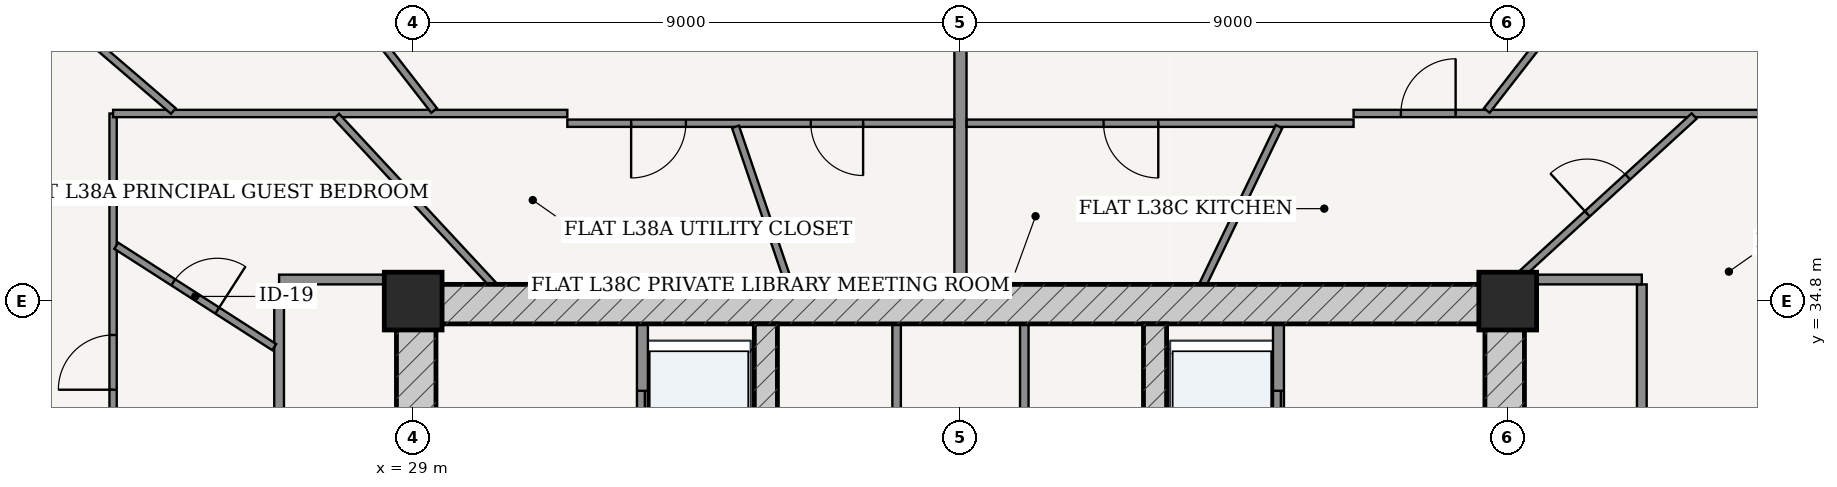
"""IFC4 building model, lengths in metres.
Left out: names, types, materials, properties, quantities, classifications, styles, units other than length and angle.
Written with IfcOpenShell. Run it as: python <this file> out.ifc"""

import sys

from ifc_helpers import new_model, si_unit, direction, frame, frame_2d, origin, origin_2d, place, context, subcontext, project, spatial, rectangle, extrude, source, transform, mapped, element, fill, save


model = new_model("IFC4")
c1 = context("Model", 3, precision=1e-05, world=origin(), true_north=direction((-0.2419218956, 0.970295726276)))
c2 = subcontext(c1, "Body", "Model", "MODEL_VIEW")
j1 = project(units=[si_unit("LENGTHUNIT", "METRE"), si_unit("PLANEANGLEUNIT", "RADIAN")], contexts=[c1])
p1 = place(None, origin())
s1 = spatial("IfcSite", under=j1, at=p1, CompositionType="ELEMENT")
p2 = place(p1, origin())
s2 = spatial("IfcBuilding", under=s1, at=p2, CompositionType="ELEMENT")
p3 = place(p2, frame((0.0, 0.0, 146.2)))
s3 = spatial("IfcBuildingStorey", under=s2, at=p3, CompositionType="ELEMENT", Elevation=146.2)
for number, where, z_axis, x_axis in (
    (1, (47.0, 34.8, 0.0), (0.0, 0.0, 1.0), (1.0, 0.0, 0.0)),
    (2, (29.0, 34.8, 0.0), (0.0, 0.0, 1.0), (1.0, 0.0, 0.0)),
):
    element("IfcColumn", number, at=place(p3, frame(where, z_axis=z_axis, x_axis=x_axis)), inside=s3, PredefinedType="COLUMN", context=c2, shape_type="SweptSolid", body=[
        extrude(rectangle(XDim=0.95, YDim=0.95, at=origin_2d()), origin(), (0.0, 0.0, 1.0), 3.6),
    ])
p4 = place(p3, frame((28.725, 34.75, 0.0), z_axis=(0.0, 0.0, 1.0), x_axis=(1.0, 0.0, 0.0)))
e3 = element("IfcWall", 3, at=p4, inside=s3, PredefinedType="SHEAR", context=c2, shape_type="SweptSolid", body=[
    extrude(rectangle(XDim=18.55, YDim=0.65, at=frame_2d((9.275, 0.0))), origin(), (0.0, 0.0, 1.0), 3.33),
])
p5 = place(p3, frame((29.05, 19.175, 0.0), z_axis=(0.0, 0.0, 1.0), x_axis=(0.0, 1.0, 0.0)))
e4 = element("IfcWall", 4, at=p5, inside=s3, PredefinedType="SHEAR", context=c2, shape_type="SweptSolid", body=[
    extrude(rectangle(XDim=15.25, YDim=0.65, at=frame_2d((7.625, 0.0))), origin(), (0.0, 0.0, 1.0), 3.33),
])
p6 = place(p5, frame((9.875, 0.0, 0.0)))
e5 = element("IfcOpeningElement", 5, at=p6, cuts=e4, PredefinedType="OPENING", context=c2, shape_type="SweptSolid", body=[
    extrude(rectangle(XDim=1.5, YDim=2.2, at=frame_2d((0.75, 1.1))), frame((0.0, 0.335, 0.0), z_axis=(0.0, -1.0, 0.0), x_axis=(1.0, 0.0, 0.0)), (0.0, 0.0, 1.0), 0.67),
])
p7 = place(p3, frame((46.95, 19.175, 0.0), z_axis=(0.0, 0.0, 1.0), x_axis=(0.0, 1.0, 0.0)))
e6 = element("IfcWall", 6, at=p7, inside=s3, PredefinedType="SHEAR", context=c2, shape_type="SweptSolid", body=[
    extrude(rectangle(XDim=15.25, YDim=0.65, at=frame_2d((7.625, 0.0))), origin(), (0.0, 0.0, 1.0), 3.33),
])
p8 = place(p7, frame((9.875, 0.0, 0.0)))
e7 = element("IfcOpeningElement", 7, at=p8, cuts=e6, PredefinedType="OPENING", context=c2, shape_type="SweptSolid", body=[
    extrude(rectangle(XDim=1.5, YDim=2.2, at=frame_2d((0.75, 1.1))), frame((0.0, 0.335, 0.0), z_axis=(0.0, -1.0, 0.0), x_axis=(1.0, 0.0, 0.0)), (0.0, 0.0, 1.0), 0.67),
])
p9 = place(p3, frame((34.8, 19.175, 0.0), z_axis=(0.0, 0.0, 1.0), x_axis=(0.0, 1.0, 0.0)))
e8 = element("IfcWall", 8, at=p9, inside=s3, PredefinedType="SHEAR", context=c2, shape_type="SweptSolid", body=[
    extrude(rectangle(XDim=15.25, YDim=0.38, at=frame_2d((7.625, 0.0))), origin(), (0.0, 0.0, 1.0), 3.33),
])
p10 = place(p9, frame((7.8, 0.0, 0.0)))
e9 = element("IfcOpeningElement", 9, at=p10, cuts=e8, PredefinedType="OPENING", context=c2, shape_type="SweptSolid", body=[
    extrude(rectangle(XDim=1.05, YDim=2.15, at=frame_2d((0.525, 1.075))), frame((0.0, 0.2, 0.0), z_axis=(0.0, -1.0, 0.0), x_axis=(1.0, 0.0, 0.0)), (0.0, 0.0, 1.0), 0.4),
])
p11 = place(p3, frame((41.2, 19.175, 0.0), z_axis=(0.0, 0.0, 1.0), x_axis=(0.0, 1.0, 0.0)))
e10 = element("IfcWall", 10, at=p11, inside=s3, PredefinedType="SHEAR", context=c2, shape_type="SweptSolid", body=[
    extrude(rectangle(XDim=15.25, YDim=0.38, at=frame_2d((7.625, 0.0))), origin(), (0.0, 0.0, 1.0), 3.33),
])
p12 = place(p11, frame((7.8, 0.0, 0.0)))
e11 = element("IfcOpeningElement", 11, at=p12, cuts=e10, PredefinedType="OPENING", context=c2, shape_type="SweptSolid", body=[
    extrude(rectangle(XDim=1.05, YDim=2.15, at=frame_2d((0.525, 1.075))), frame((0.0, 0.2, 0.0), z_axis=(0.0, -1.0, 0.0), x_axis=(1.0, 0.0, 0.0)), (0.0, 0.0, 1.0), 0.4),
])
p13 = place(p3, frame((32.77, 28.52, 0.0), z_axis=(0.0, 0.0, 1.0), x_axis=(0.0, 1.0, 0.0)))
e12 = element("IfcWall", 12, at=p13, inside=s3, PredefinedType="PARTITIONING", context=c2, shape_type="SweptSolid", body=[
    extrude(rectangle(XDim=5.905, YDim=0.18, at=frame_2d((2.953, 0.0))), origin(), (0.0, 0.0, 1.0), 3.33),
])
p14 = place(p13, frame((3.655, 0.0, 0.0)))
e13 = element("IfcOpeningElement", 13, at=p14, cuts=e12, PredefinedType="OPENING", context=c2, shape_type="SweptSolid", body=[
    extrude(rectangle(XDim=1.15, YDim=2.2, at=frame_2d((0.575, 1.1))), frame((0.0, 0.1, 0.0), z_axis=(0.0, -1.0, 0.0), x_axis=(1.0, 0.0, 0.0)), (0.0, 0.0, 1.0), 0.2),
])
p15 = place(p13, frame((0.73, 0.0, 0.0)))
e14 = element("IfcOpeningElement", 14, at=p15, cuts=e12, PredefinedType="OPENING", context=c2, shape_type="SweptSolid", body=[
    extrude(rectangle(XDim=1.2, YDim=2.25, at=frame_2d((0.6, 1.125))), frame((0.0, 0.1, 0.0), z_axis=(0.0, -1.0, 0.0), x_axis=(1.0, 0.0, 0.0)), (0.0, 0.0, 1.0), 0.2),
])
p16 = place(p3, frame((43.23, 28.52, 0.0), z_axis=(0.0, 0.0, 1.0), x_axis=(0.0, 1.0, 0.0)))
e15 = element("IfcWall", 15, at=p16, inside=s3, PredefinedType="PARTITIONING", context=c2, shape_type="SweptSolid", body=[
    extrude(rectangle(XDim=5.905, YDim=0.18, at=frame_2d((2.953, 0.0))), origin(), (0.0, 0.0, 1.0), 3.33),
])
p17 = place(p16, frame((0.905, 0.0, 0.0)))
e16 = element("IfcOpeningElement", 16, at=p17, cuts=e15, PredefinedType="OPENING", context=c2, shape_type="SweptSolid", body=[
    extrude(rectangle(XDim=0.85, YDim=2.1, at=frame_2d((0.425, 1.05))), frame((0.0, 0.1, 0.0), z_axis=(0.0, -1.0, 0.0), x_axis=(1.0, 0.0, 0.0)), (0.0, 0.0, 1.0), 0.2),
])
p18 = place(p16, frame((3.655, 0.0, 0.0)))
e17 = element("IfcOpeningElement", 17, at=p18, cuts=e15, PredefinedType="OPENING", context=c2, shape_type="SweptSolid", body=[
    extrude(rectangle(XDim=1.15, YDim=2.2, at=frame_2d((0.575, 1.1))), frame((0.0, 0.1, 0.0), z_axis=(0.0, -1.0, 0.0), x_axis=(1.0, 0.0, 0.0)), (0.0, 0.0, 1.0), 0.2),
])
for number, where, z_axis, x_axis in (
    (18, (36.95, 28.56, 0.0), (0.0, 0.0, 1.0), (0.0, 1.0, 0.0)),
    (19, (39.05, 28.56, 0.0), (0.0, 0.0, 1.0), (0.0, 1.0, 0.0)),
):
    element("IfcWall", number, at=place(p3, frame(where, z_axis=z_axis, x_axis=x_axis)), inside=s3, PredefinedType="PARTITIONING", context=c2, shape_type="SweptSolid", body=[
        extrude(rectangle(XDim=5.865, YDim=0.14, at=frame_2d((2.933, 0.0))), origin(), (0.0, 0.0, 1.0), 3.33),
    ])
p19 = place(p3, frame((26.795, 24.4, 0.0), z_axis=(0.0, 0.0, 1.0), x_axis=(0.0, 1.0, 0.0)))
e20 = element("IfcWall", 20, at=p19, inside=s3, PredefinedType="PARTITIONING", context=c2, shape_type="SweptSolid", body=[
    extrude(rectangle(XDim=10.675, YDim=0.16, at=frame_2d((5.337, 0.0))), origin(), (0.0, 0.0, 1.0), 2.776),
])
p20 = place(p19, frame((6.702, 0.0, 0.0)))
e21 = element("IfcOpeningElement", 21, at=p20, cuts=e20, PredefinedType="OPENING", context=c2, shape_type="SweptSolid", body=[
    extrude(rectangle(XDim=0.98, YDim=2.2, at=frame_2d((0.49, 1.1))), frame((0.0, 0.09, 0.0), z_axis=(0.0, -1.0, 0.0), x_axis=(1.0, 0.0, 0.0)), (0.0, 0.0, 1.0), 0.18),
])
p21 = place(p3, frame((26.795, 35.155, 0.0), z_axis=(0.0, 0.0, 1.0), x_axis=(1.0, 0.0, 0.0)))
e22 = element("IfcWall", 22, at=p21, inside=s3, PredefinedType="PARTITIONING", context=c2, shape_type="SweptSolid", body=[
    extrude(rectangle(XDim=1.93, YDim=0.16, at=frame_2d((0.965, 0.0))), origin(), (0.0, 0.0, 1.0), 2.776),
])
p22 = place(p3, frame((49.205, 16.675, 0.0), z_axis=(0.0, 0.0, 1.0), x_axis=(0.0, 1.0, 0.0)))
e23 = element("IfcWall", 23, at=p22, inside=s3, PredefinedType="PARTITIONING", context=c2, shape_type="SweptSolid", body=[
    extrude(rectangle(XDim=18.4, YDim=0.16, at=frame_2d((9.2, 0.0))), origin(), (0.0, 0.0, 1.0), 2.776),
])
p23 = place(p22, frame((15.299, 0.0, 0.0)))
e24 = element("IfcOpeningElement", 24, at=p23, cuts=e23, PredefinedType="OPENING", context=c2, shape_type="SweptSolid", body=[
    extrude(rectangle(XDim=0.98, YDim=2.2, at=frame_2d((0.49, 1.1))), frame((0.0, 0.09, 0.0), z_axis=(0.0, -1.0, 0.0), x_axis=(1.0, 0.0, 0.0)), (0.0, 0.0, 1.0), 0.18),
])
p24 = place(p3, frame((47.275, 35.155, 0.0), z_axis=(0.0, 0.0, 1.0), x_axis=(1.0, 0.0, 0.0)))
e25 = element("IfcWall", 25, at=p24, inside=s3, PredefinedType="PARTITIONING", context=c2, shape_type="SweptSolid", body=[
    extrude(rectangle(XDim=1.93, YDim=0.16, at=frame_2d((0.965, 0.0))), origin(), (0.0, 0.0, 1.0), 2.776),
])
p25 = place(p3, frame((38.0, 35.075, 0.0), z_axis=(0.0, 0.0, 1.0), x_axis=(0.0, 1.0, 0.0)))
e26 = element("IfcWall", 26, at=p25, inside=s3, PredefinedType="PARTITIONING", context=c2, shape_type="SweptSolid", body=[
    extrude(rectangle(XDim=12.465, YDim=0.2, at=frame_2d((6.232, 0.0))), origin(), (0.0, 0.0, 1.0), 2.415),
])
p26 = place(p3, frame((24.065, 21.941, 0.0), z_axis=(0.0, 0.0, 1.0), x_axis=(0.0, 1.0, 0.0)))
e27 = element("IfcWall", 27, at=p26, inside=s3, PredefinedType="PARTITIONING", context=c2, shape_type="SweptSolid", body=[
    extrude(rectangle(XDim=15.944, YDim=0.12, at=frame_2d((7.972, 0.0))), origin(), (0.0, 0.0, 1.0), 2.776),
])
p27 = place(p26, frame((5.602, 0.0, 0.0)))
e28 = element("IfcOpeningElement", 28, at=p27, cuts=e27, PredefinedType="OPENING", context=c2, shape_type="SweptSolid", body=[
    extrude(rectangle(XDim=0.9, YDim=2.15, at=frame_2d((0.45, 1.075))), frame((0.0, 0.07, 0.0), z_axis=(0.0, -1.0, 0.0), x_axis=(1.0, 0.0, 0.0)), (0.0, 0.0, 1.0), 0.14),
])
p28 = place(p26, frame((1.707, 0.0, 0.0)))
e29 = element("IfcOpeningElement", 29, at=p28, cuts=e27, PredefinedType="OPENING", context=c2, shape_type="SweptSolid", body=[
    extrude(rectangle(XDim=0.9, YDim=2.15, at=frame_2d((0.45, 1.075))), frame((0.0, 0.07, 0.0), z_axis=(0.0, -1.0, 0.0), x_axis=(1.0, 0.0, 0.0)), (0.0, 0.0, 1.0), 0.14),
])
p29 = place(p26, frame((11.402, 0.0, 0.0)))
e30 = element("IfcOpeningElement", 30, at=p29, cuts=e27, PredefinedType="OPENING", context=c2, shape_type="SweptSolid", body=[
    extrude(rectangle(XDim=0.9, YDim=2.15, at=frame_2d((0.45, 1.075))), frame((0.0, 0.07, 0.0), z_axis=(0.0, -1.0, 0.0), x_axis=(1.0, 0.0, 0.0)), (0.0, 0.0, 1.0), 0.14),
])
p30 = place(p3, frame((24.065, 37.885, 0.0), z_axis=(0.0, 0.0, 1.0), x_axis=(1.0, 0.0, 0.0)))
e31 = element("IfcWall", 31, at=p30, inside=s3, PredefinedType="PARTITIONING", context=c2, shape_type="SweptSolid", body=[
    extrude(rectangle(XDim=7.47, YDim=0.12, at=frame_2d((3.735, 0.0))), origin(), (0.0, 0.0, 1.0), 2.776),
])
p31 = place(p3, frame((31.535, 37.725, 0.0), z_axis=(0.0, 0.0, 1.0), x_axis=(1.0, 0.0, 0.0)))
e32 = element("IfcWall", 32, at=p31, inside=s3, PredefinedType="PARTITIONING", context=c2, shape_type="SweptSolid", body=[
    extrude(rectangle(XDim=6.363, YDim=0.12, at=frame_2d((3.182, 0.0))), origin(), (0.0, 0.0, 1.0), 2.776),
])
p32 = place(p31, frame((4.004, 0.0, 0.0)))
e33 = element("IfcOpeningElement", 33, at=p32, cuts=e32, PredefinedType="OPENING", context=c2, shape_type="SweptSolid", body=[
    extrude(rectangle(XDim=0.86, YDim=2.15, at=frame_2d((0.43, 1.075))), frame((0.0, 0.07, 0.0), z_axis=(0.0, -1.0, 0.0), x_axis=(1.0, 0.0, 0.0)), (0.0, 0.0, 1.0), 0.14),
])
p33 = place(p31, frame((1.049, 0.0, 0.0)))
e34 = element("IfcOpeningElement", 34, at=p33, cuts=e32, PredefinedType="OPENING", context=c2, shape_type="SweptSolid", body=[
    extrude(rectangle(XDim=0.9, YDim=2.15, at=frame_2d((0.45, 1.075))), frame((0.0, 0.07, 0.0), z_axis=(0.0, -1.0, 0.0), x_axis=(1.0, 0.0, 0.0)), (0.0, 0.0, 1.0), 0.14),
])
p34 = place(p3, frame((29.344, 37.934, 0.0), z_axis=(0.0, 0.0, 1.0), x_axis=(-0.613758289074, 0.789493991487, 0.0)))
e35 = element("IfcWall", 35, at=p34, inside=s3, PredefinedType="PARTITIONING", context=c2, shape_type="SweptSolid", body=[
    extrude(rectangle(XDim=7.695, YDim=0.12, at=frame_2d((3.848, 0.0))), origin(), (0.0, 0.0, 1.0), 2.776),
])
p35 = place(p34, frame((2.399, 0.0, 0.0)))
e36 = element("IfcOpeningElement", 36, at=p35, cuts=e35, PredefinedType="OPENING", context=c2, shape_type="SweptSolid", body=[
    extrude(rectangle(XDim=0.9, YDim=2.15, at=frame_2d((0.45, 1.075))), frame((0.0, 0.07, 0.0), z_axis=(0.0, -1.0, 0.0), x_axis=(1.0, 0.0, 0.0)), (0.0, 0.0, 1.0), 0.14),
])
p36 = place(p3, frame((25.056, 37.925, 0.0), z_axis=(0.0, 0.0, 1.0), x_axis=(-0.758354915574, 0.65184186888, 0.0)))
e37 = element("IfcWall", 37, at=p36, inside=s3, PredefinedType="PARTITIONING", context=c2, shape_type="SweptSolid", body=[
    extrude(rectangle(XDim=5.432, YDim=0.12, at=frame_2d((2.716, 0.0))), origin(), (0.0, 0.0, 1.0), 2.846),
])
p37 = place(p36, frame((2.266, 0.0, 0.0)))
e38 = element("IfcOpeningElement", 38, at=p37, cuts=e37, PredefinedType="OPENING", context=c2, shape_type="SweptSolid", body=[
    extrude(rectangle(XDim=0.9, YDim=2.15, at=frame_2d((0.45, 1.075))), frame((0.0, 0.07, 0.0), z_axis=(0.0, -1.0, 0.0), x_axis=(1.0, 0.0, 0.0)), (0.0, 0.0, 1.0), 0.14),
])
p38 = place(p3, frame((24.007, 31.782, 0.0), z_axis=(0.0, 0.0, 1.0), x_axis=(-0.942077868165, 0.335394231187, 0.0)))
e39 = element("IfcWall", 39, at=p38, inside=s3, PredefinedType="PARTITIONING", context=c2, shape_type="SweptSolid", body=[
    extrude(rectangle(XDim=8.817, YDim=0.12, at=frame_2d((4.408, 0.0))), origin(), (0.0, 0.0, 1.0), 2.846),
])
p39 = place(p38, frame((3.958, 0.0, 0.0)))
e40 = element("IfcOpeningElement", 40, at=p39, cuts=e39, PredefinedType="OPENING", context=c2, shape_type="SweptSolid", body=[
    extrude(rectangle(XDim=0.9, YDim=2.15, at=frame_2d((0.45, 1.075))), frame((0.0, 0.07, 0.0), z_axis=(0.0, -1.0, 0.0), x_axis=(1.0, 0.0, 0.0)), (0.0, 0.0, 1.0), 0.14),
])
p40 = place(p3, frame((35.182, 35.075, 0.0), z_axis=(0.0, 0.0, 1.0), x_axis=(-0.322321614946, 0.946630221649, 0.0)))
e41 = element("IfcWall", 41, at=p40, inside=s3, PredefinedType="PARTITIONING", context=c2, shape_type="SweptSolid", body=[
    extrude(rectangle(XDim=2.737, YDim=0.12, at=frame_2d((1.369, 0.0))), origin(), (0.0, 0.0, 1.0), 2.415),
])
p41 = place(p3, frame((30.307, 35.075, 0.0), z_axis=(0.0, 0.0, 1.0), x_axis=(-0.68082810609, 0.732443233267, 0.0)))
e42 = element("IfcWall", 42, at=p41, inside=s3, PredefinedType="PARTITIONING", context=c2, shape_type="SweptSolid", body=[
    extrude(rectangle(XDim=3.775, YDim=0.12, at=frame_2d((1.887, 0.0))), origin(), (0.0, 0.0, 1.0), 2.776),
])
p42 = place(p3, frame((26.715, 34.043, 0.0), z_axis=(0.0, 0.0, 1.0), x_axis=(-0.841597086151, 0.540105864235, 0.0)))
e43 = element("IfcWall", 43, at=p42, inside=s3, PredefinedType="PARTITIONING", context=c2, shape_type="SweptSolid", body=[
    extrude(rectangle(XDim=3.087, YDim=0.12, at=frame_2d((1.543, 0.0))), origin(), (0.0, 0.0, 1.0), 3.005),
])
p43 = place(p42, frame((1.113, 0.0, 0.0)))
e44 = element("IfcOpeningElement", 44, at=p43, cuts=e43, PredefinedType="OPENING", context=c2, shape_type="SweptSolid", body=[
    extrude(rectangle(XDim=0.86, YDim=2.15, at=frame_2d((0.43, 1.075))), frame((0.0, 0.07, 0.0), z_axis=(0.0, -1.0, 0.0), x_axis=(1.0, 0.0, 0.0)), (0.0, 0.0, 1.0), 0.14),
])
p44 = place(p3, frame((38.102, 37.725, 0.0), z_axis=(0.0, 0.0, 1.0), x_axis=(1.0, 0.0, 0.0)))
e45 = element("IfcWall", 45, at=p44, inside=s3, PredefinedType="PARTITIONING", context=c2, shape_type="SweptSolid", body=[
    extrude(rectangle(XDim=6.363, YDim=0.12, at=frame_2d((3.182, 0.0))), origin(), (0.0, 0.0, 1.0), 2.776),
])
p45 = place(p44, frame((2.251, 0.0, 0.0)))
e46 = element("IfcOpeningElement", 46, at=p45, cuts=e45, PredefinedType="OPENING", context=c2, shape_type="SweptSolid", body=[
    extrude(rectangle(XDim=0.9, YDim=2.15, at=frame_2d((0.45, 1.075))), frame((0.0, 0.07, 0.0), z_axis=(0.0, -1.0, 0.0), x_axis=(1.0, 0.0, 0.0)), (0.0, 0.0, 1.0), 0.14),
])
p46 = place(p3, frame((44.465, 37.885, 0.0), z_axis=(0.0, 0.0, 1.0), x_axis=(1.0, 0.0, 0.0)))
e47 = element("IfcWall", 47, at=p46, inside=s3, PredefinedType="PARTITIONING", context=c2, shape_type="SweptSolid", body=[
    extrude(rectangle(XDim=7.47, YDim=0.12, at=frame_2d((3.735, 0.0))), origin(), (0.0, 0.0, 1.0), 2.776),
])
p47 = place(p46, frame((0.778, 0.0, 0.0)))
e48 = element("IfcOpeningElement", 48, at=p47, cuts=e47, PredefinedType="OPENING", context=c2, shape_type="SweptSolid", body=[
    extrude(rectangle(XDim=0.9, YDim=2.15, at=frame_2d((0.45, 1.075))), frame((0.0, 0.07, 0.0), z_axis=(0.0, -1.0, 0.0), x_axis=(1.0, 0.0, 0.0)), (0.0, 0.0, 1.0), 0.14),
])
p48 = place(p3, frame((46.656, 37.934, 0.0), z_axis=(0.0, 0.0, 1.0), x_axis=(0.613758289074, 0.789493991487, 0.0)))
e49 = element("IfcWall", 49, at=p48, inside=s3, PredefinedType="PARTITIONING", context=c2, shape_type="SweptSolid", body=[
    extrude(rectangle(XDim=7.695, YDim=0.12, at=frame_2d((3.848, 0.0))), origin(), (0.0, 0.0, 1.0), 2.776),
])
p49 = place(p48, frame((2.395, 0.0, 0.0)))
e50 = element("IfcOpeningElement", 50, at=p49, cuts=e49, PredefinedType="OPENING", context=c2, shape_type="SweptSolid", body=[
    extrude(rectangle(XDim=0.9, YDim=2.15, at=frame_2d((0.45, 1.075))), frame((0.0, 0.07, 0.0), z_axis=(0.0, -1.0, 0.0), x_axis=(1.0, 0.0, 0.0)), (0.0, 0.0, 1.0), 0.14),
])
p50 = place(p3, frame((47.216, 35.235, 0.0), z_axis=(0.0, 0.0, 1.0), x_axis=(0.73766811085, 0.675163504816, 0.0)))
e51 = element("IfcWall", 51, at=p50, inside=s3, PredefinedType="PARTITIONING", context=c2, shape_type="SweptSolid", body=[
    extrude(rectangle(XDim=3.863, YDim=0.12, at=frame_2d((1.932, 0.0))), origin(), (0.0, 0.0, 1.0), 2.776),
])
p51 = place(p50, frame((1.481, 0.0, 0.0)))
e52 = element("IfcOpeningElement", 52, at=p51, cuts=e51, PredefinedType="OPENING", context=c2, shape_type="SweptSolid", body=[
    extrude(rectangle(XDim=0.9, YDim=2.15, at=frame_2d((0.45, 1.075))), frame((0.0, 0.07, 0.0), z_axis=(0.0, -1.0, 0.0), x_axis=(1.0, 0.0, 0.0)), (0.0, 0.0, 1.0), 0.14),
])
p52 = place(p3, frame((41.988, 35.075, 0.0), z_axis=(0.0, 0.0, 1.0), x_axis=(0.434144408634, 0.900843289619, 0.0)))
e53 = element("IfcWall", 53, at=p52, inside=s3, PredefinedType="PARTITIONING", context=c2, shape_type="SweptSolid", body=[
    extrude(rectangle(XDim=2.88, YDim=0.12, at=frame_2d((1.44, 0.0))), origin(), (0.0, 0.0, 1.0), 3.33),
])
m1 = source(origin(), c2, "Body", "SweptSolid", [
    extrude(rectangle(XDim=1.15, YDim=2.2, at=frame_2d((0.575, 1.1))), frame((0.0, 0.025, 0.0), z_axis=(0.0, -1.0, 0.0), x_axis=(1.0, 0.0, 0.0)), (0.0, 0.0, 1.0), 0.05),
])
p53 = place(p14, origin())
e54 = element("IfcDoor", 54, at=p53, inside=s3, OperationType="DOUBLE_DOOR_SLIDING", PredefinedType="DOOR", context=c2, shape_type="MappedRepresentation", body=[
    mapped(m1, transform((0.0, 0.0, 0.0), scale=1.0)),
])
fill(e13, e54)
p54 = place(p18, origin())
e55 = element("IfcDoor", 55, at=p54, inside=s3, OperationType="DOUBLE_DOOR_SLIDING", PredefinedType="DOOR", context=c2, shape_type="MappedRepresentation", body=[
    mapped(m1, transform((0.0, 0.0, 0.0), scale=1.0)),
])
fill(e17, e55)
m2 = source(origin(), c2, "Body", "SweptSolid", [
    extrude(rectangle(XDim=0.86, YDim=2.15, at=frame_2d((0.43, 1.075))), frame((0.0, 0.025, 0.0), z_axis=(0.0, -1.0, 0.0), x_axis=(1.0, 0.0, 0.0)), (0.0, 0.0, 1.0), 0.05),
])
p55 = place(p43, frame((0.86, 0.0, 0.0), z_axis=(0.0, 0.0, 1.0), x_axis=(-1.0, 0.0, 0.0)))
e56 = element("IfcDoor", 56, at=p55, inside=s3, OperationType="SINGLE_SWING_RIGHT", PredefinedType="DOOR", context=c2, shape_type="MappedRepresentation", body=[
    mapped(m2, transform((0.0, 0.0, 0.0), scale=1.0)),
])
fill(e44, e56)
m3 = source(origin(), c2, "Body", "SweptSolid", [
    extrude(rectangle(XDim=0.9, YDim=2.15, at=frame_2d((0.45, 1.075))), frame((0.0, 0.025, 0.0), z_axis=(0.0, -1.0, 0.0), x_axis=(1.0, 0.0, 0.0)), (0.0, 0.0, 1.0), 0.05),
])
p56 = place(p29, origin())
e57 = element("IfcDoor", 57, at=p56, inside=s3, OperationType="SINGLE_SWING_LEFT", PredefinedType="DOOR", context=c2, shape_type="MappedRepresentation", body=[
    mapped(m3, transform((0.0, 0.0, 0.0), scale=1.0)),
])
fill(e30, e57)
p57 = place(p32, frame((0.86, 0.0, 0.0), z_axis=(0.0, 0.0, 1.0), x_axis=(-1.0, 0.0, 0.0)))
e58 = element("IfcDoor", 58, at=p57, inside=s3, OperationType="SINGLE_SWING_LEFT", PredefinedType="DOOR", context=c2, shape_type="MappedRepresentation", body=[
    mapped(m2, transform((0.0, 0.0, 0.0), scale=1.0)),
])
fill(e33, e58)
p58 = place(p33, frame((0.9, 0.0, 0.0), z_axis=(0.0, 0.0, 1.0), x_axis=(-1.0, 0.0, 0.0)))
e59 = element("IfcDoor", 59, at=p58, inside=s3, OperationType="SINGLE_SWING_RIGHT", PredefinedType="DOOR", context=c2, shape_type="MappedRepresentation", body=[
    mapped(m3, transform((0.0, 0.0, 0.0), scale=1.0)),
])
fill(e34, e59)
p59 = place(p51, origin())
e60 = element("IfcDoor", 60, at=p59, inside=s3, OperationType="SINGLE_SWING_LEFT", PredefinedType="DOOR", context=c2, shape_type="MappedRepresentation", body=[
    mapped(m3, transform((0.0, 0.0, 0.0), scale=1.0)),
])
fill(e52, e60)
p60 = place(p47, origin())
e61 = element("IfcDoor", 61, at=p60, inside=s3, OperationType="SINGLE_SWING_RIGHT", PredefinedType="DOOR", context=c2, shape_type="MappedRepresentation", body=[
    mapped(m3, transform((0.0, 0.0, 0.0), scale=1.0)),
])
fill(e48, e61)
p61 = place(p45, frame((0.9, 0.0, 0.0), z_axis=(0.0, 0.0, 1.0), x_axis=(-1.0, 0.0, 0.0)))
e62 = element("IfcDoor", 62, at=p61, inside=s3, OperationType="SINGLE_SWING_LEFT", PredefinedType="DOOR", context=c2, shape_type="MappedRepresentation", body=[
    mapped(m3, transform((0.0, 0.0, 0.0), scale=1.0)),
])
fill(e46, e62)
save(model, sys.argv[1])
